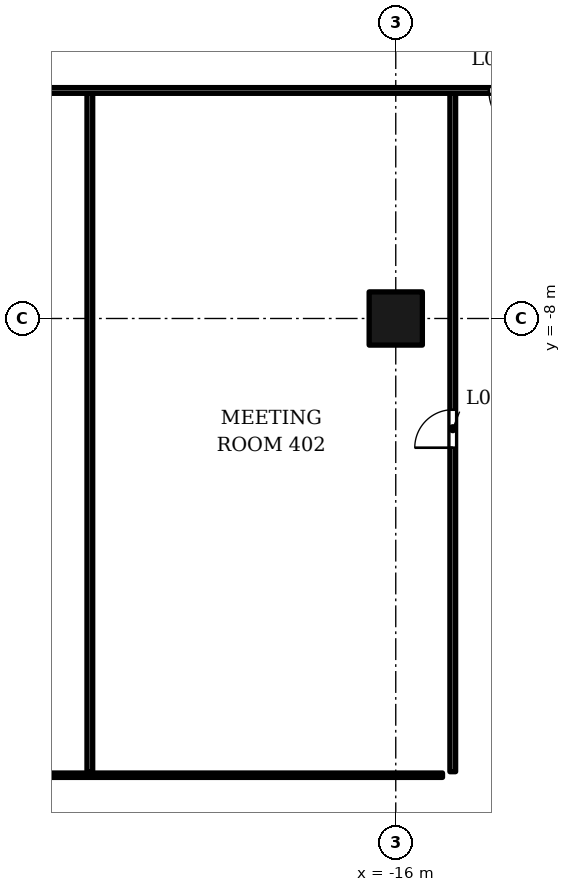
"""IFC4 building model, lengths in metres.
Left out: names, types, materials, properties, quantities, classifications, styles, units other than length and angle.
Written with IfcOpenShell. Run it as: python <this file> out.ifc"""

import sys

from ifc_helpers import new_model, si_unit, direction, frame, frame_2d, origin, origin_2d, place, context, subcontext, project, spatial, rectangle, extrude, element, fill, save


model = new_model("IFC4")
c1 = context("Model", 3, precision=1e-05, world=origin(), true_north=direction((0.0, 1.0)))
c2 = subcontext(c1, "Body", "Model", "MODEL_VIEW")
j1 = project(units=[si_unit("LENGTHUNIT", "METRE"), si_unit("PLANEANGLEUNIT", "RADIAN")], contexts=[c1])
p1 = place(None, origin())
s1 = spatial("IfcSite", under=j1, at=p1, CompositionType="ELEMENT")
p2 = place(p1, origin())
s2 = spatial("IfcBuilding", under=s1, at=p2, CompositionType="ELEMENT")
p3 = place(p2, frame((0.0, 0.0, 34.5)))
s3 = spatial("IfcBuildingStorey", under=s2, at=p3, CompositionType="ELEMENT", Elevation=34.5)
p4 = place(p3, frame((-16.0, -8.0, 0.0), z_axis=(0.0, 0.0, 1.0), x_axis=(1.0, 0.0, 0.0)))
e1 = element("IfcColumn", 1, at=p4, inside=s3, PredefinedType="COLUMN", context=c2, shape_type="SweptSolid", body=[
    extrude(rectangle(XDim=1.4, YDim=1.4, at=origin_2d()), origin(), (0.0, 0.0, 1.0), 5.5),
])
p5 = place(p3, frame((-33.675, -20.018, 0.0), z_axis=(0.0, 0.0, 1.0), x_axis=(1.0, 0.0, 0.0)))
e2 = element("IfcWall", 2, at=p5, inside=s3, PredefinedType="PARTITIONING", context=c2, shape_type="SweptSolid", body=[
    extrude(rectangle(XDim=18.905, YDim=0.115, at=frame_2d((9.453, 0.0))), origin(), (0.0, 0.0, 1.0), 3.85),
])
p6 = place(p5, frame((4.425, 0.0, 0.0)))
e3 = element("IfcOpeningElement", 3, at=p6, cuts=e2, PredefinedType="OPENING", context=c2, shape_type="SweptSolid", body=[
    extrude(rectangle(XDim=1.0, YDim=2.1, at=frame_2d((0.5, 1.05))), frame((0.0, 0.067, 0.0), z_axis=(0.0, -1.0, 0.0), x_axis=(1.0, 0.0, 0.0)), (0.0, 0.0, 1.0), 0.135),
])
p7 = place(p3, frame((-24.05, -19.925, 0.0), z_axis=(0.0, 0.0, 1.0), x_axis=(0.0, 1.0, 0.0)))
e4 = element("IfcWall", 4, at=p7, inside=s3, PredefinedType="PARTITIONING", context=c2, shape_type="SweptSolid", body=[
    extrude(rectangle(XDim=17.85, YDim=0.15, at=frame_2d((8.925, 0.0))), origin(), (0.0, 0.0, 1.0), 3.85),
])
p8 = place(p3, frame((-14.5, -19.925, 0.0), z_axis=(0.0, 0.0, 1.0), x_axis=(0.0, 1.0, 0.0)))
e5 = element("IfcWall", 5, at=p8, inside=s3, PredefinedType="PARTITIONING", context=c2, shape_type="SweptSolid", body=[
    extrude(rectangle(XDim=17.85, YDim=0.15, at=frame_2d((8.925, 0.0))), origin(), (0.0, 0.0, 1.0), 3.85),
])
p9 = place(p8, frame((8.525, 0.0, 0.0)))
e6 = element("IfcOpeningElement", 6, at=p9, cuts=e5, PredefinedType="OPENING", context=c2, shape_type="SweptSolid", body=[
    extrude(rectangle(XDim=1.0, YDim=2.1, at=frame_2d((0.5, 1.05))), frame((0.0, 0.085, 0.0), z_axis=(0.0, -1.0, 0.0), x_axis=(1.0, 0.0, 0.0)), (0.0, 0.0, 1.0), 0.17),
])
p10 = place(p3, frame((-33.46, -2.0, 0.0), z_axis=(0.0, 0.0, 1.0), x_axis=(1.0, 0.0, 0.0)))
e7 = element("IfcWall", 7, at=p10, inside=s3, PredefinedType="PARTITIONING", context=c2, shape_type="SweptSolid", body=[
    extrude(rectangle(XDim=66.92, YDim=0.15, at=frame_2d((33.46, 0.0))), origin(), (0.0, 0.0, 1.0), 3.85),
])
p11 = place(p10, frame((19.91, 0.0, 0.0)))
e8 = element("IfcOpeningElement", 8, at=p11, cuts=e7, PredefinedType="OPENING", context=c2, shape_type="SweptSolid", body=[
    extrude(rectangle(XDim=1.2, YDim=2.1, at=frame_2d((0.6, 1.05))), frame((0.0, 0.085, 0.0), z_axis=(0.0, -1.0, 0.0), x_axis=(1.0, 0.0, 0.0)), (0.0, 0.0, 1.0), 0.17),
])
p12 = place(p10, frame((45.91, 0.0, 0.0)))
e9 = element("IfcOpeningElement", 9, at=p12, cuts=e7, PredefinedType="OPENING", context=c2, shape_type="SweptSolid", body=[
    extrude(rectangle(XDim=1.2, YDim=2.1, at=frame_2d((0.6, 1.05))), frame((0.0, 0.085, 0.0), z_axis=(0.0, -1.0, 0.0), x_axis=(1.0, 0.0, 0.0)), (0.0, 0.0, 1.0), 0.17),
])
p13 = place(p10, frame((30.11, 0.0, 0.0)))
e10 = element("IfcOpeningElement", 10, at=p13, cuts=e7, PredefinedType="OPENING", context=c2, shape_type="SweptSolid", body=[
    extrude(rectangle(XDim=1.0, YDim=2.1, at=frame_2d((0.5, 1.05))), frame((0.0, 0.085, 0.0), z_axis=(0.0, -1.0, 0.0), x_axis=(1.0, 0.0, 0.0)), (0.0, 0.0, 1.0), 0.17),
])
p14 = place(p10, frame((35.86, 0.0, 0.0)))
e11 = element("IfcOpeningElement", 11, at=p14, cuts=e7, PredefinedType="OPENING", context=c2, shape_type="SweptSolid", body=[
    extrude(rectangle(XDim=1.0, YDim=2.1, at=frame_2d((0.5, 1.05))), frame((0.0, 0.085, 0.0), z_axis=(0.0, -1.0, 0.0), x_axis=(1.0, 0.0, 0.0)), (0.0, 0.0, 1.0), 0.17),
])
p15 = place(p11, origin())
e12 = element("IfcDoor", 12, at=p15, inside=s3, OperationType="SINGLE_SWING_RIGHT", PredefinedType="DOOR", context=c2, shape_type="SweptSolid", body=[
    extrude(rectangle(XDim=1.2, YDim=2.1, at=frame_2d((0.6, 1.05))), frame((0.0, 0.025, 0.0), z_axis=(0.0, -1.0, 0.0), x_axis=(1.0, 0.0, 0.0)), (0.0, 0.0, 1.0), 0.05),
])
fill(e8, e12)
p16 = place(p9, origin())
e13 = element("IfcDoor", 13, at=p16, inside=s3, OperationType="SINGLE_SWING_LEFT", PredefinedType="DOOR", context=c2, shape_type="SweptSolid", body=[
    extrude(rectangle(XDim=1.0, YDim=2.1, at=frame_2d((0.5, 1.05))), frame((0.0, 0.025, 0.0), z_axis=(0.0, -1.0, 0.0), x_axis=(1.0, 0.0, 0.0)), (0.0, 0.0, 1.0), 0.05),
])
fill(e6, e13)
save(model, sys.argv[1])
